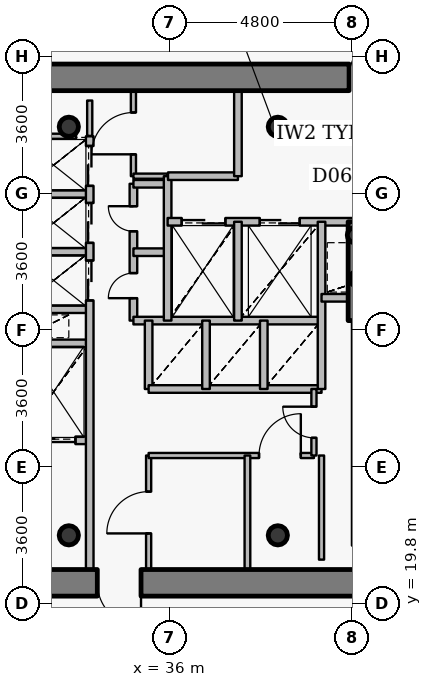
"""IFC4 building model, lengths in metres.
Left out: names, types, materials, properties, quantities, classifications, styles, units other than length and angle.
Written with IfcOpenShell. Run it as: python <this file> out.ifc"""

import sys

from ifc_helpers import new_model, si_unit, direction, frame, frame_2d, origin, origin_2d, place, context, subcontext, project, spatial, rectangle, hollow_circle, extrude, source, transform, mapped, element, fill, save


model = new_model("IFC4")
c1 = context("Model", 3, precision=1e-05, world=origin(), true_north=direction((0.0, 1.0)))
c2 = subcontext(c1, "Body", "Model", "MODEL_VIEW")
j1 = project(units=[si_unit("LENGTHUNIT", "METRE"), si_unit("PLANEANGLEUNIT", "RADIAN")], contexts=[c1])
p1 = place(None, origin())
s1 = spatial("IfcSite", under=j1, at=p1, CompositionType="ELEMENT")
p2 = place(p1, origin())
s2 = spatial("IfcBuilding", under=s1, at=p2, CompositionType="ELEMENT")
p3 = place(p2, frame((0.0, 0.0, 214.05)))
s3 = spatial("IfcBuildingStorey", under=s2, at=p3, CompositionType="ELEMENT", Elevation=214.05)
for number, where, z_axis, x_axis in (
    (1, (33.35, 21.6, 0.0), (0.0, 0.0, 1.0), (1.0, 0.0, 0.0)),
    (2, (38.85, 21.6, 0.0), (0.0, 0.0, 1.0), (1.0, 0.0, 0.0)),
    (3, (38.85, 32.35, 0.0), (0.0, 0.0, 1.0), (1.0, 0.0, 0.0)),
    (4, (33.35, 32.35, 0.0), (0.0, 0.0, 1.0), (1.0, 0.0, 0.0)),
):
    element("IfcColumn", number, at=place(p3, frame(where, z_axis=z_axis, x_axis=x_axis)), inside=s3, PredefinedType="COLUMN", context=c2, shape_type="SweptSolid", body=[
        extrude(hollow_circle(Radius=0.254, WallThickness=0.02, at=origin_2d()), origin(), (0.0, 0.0, 1.0), 3.75),
    ])
for number, where, z_axis, x_axis in (
    (5, (40.95, 28.35, 0.0), (0.0, 0.0, 1.0), (1.0, 0.0, 0.0)),
    (6, (40.88, 29.5, 0.0), (0.0, 0.0, 1.0), (1.0, 0.0, 0.0)),
):
    element("IfcColumn", number, at=place(p3, frame(where, z_axis=z_axis, x_axis=x_axis)), inside=s3, PredefinedType="COLUMN", context=c2, shape_type="SweptSolid", body=[
        extrude(hollow_circle(Radius=0.203, WallThickness=0.016, at=origin_2d()), origin(), (0.0, 0.0, 1.0), 3.75),
    ])
p4 = place(p3, frame((27.05, 33.65, 0.0), z_axis=(0.0, 0.0, 1.0), x_axis=(1.0, 0.0, 0.0)))
e7 = element("IfcWall", 7, at=p4, inside=s3, PredefinedType="SHEAR", context=c2, shape_type="SweptSolid", body=[
    extrude(rectangle(XDim=17.9, YDim=0.7, at=frame_2d((8.95, 0.0))), origin(), (0.0, 0.0, 1.0), 3.05),
])
p5 = place(p4, frame((13.675, 0.0, 0.0)))
e8 = element("IfcOpeningElement", 8, at=p5, cuts=e7, PredefinedType="OPENING", context=c2, shape_type="SweptSolid", body=[
    extrude(rectangle(XDim=1.15, YDim=2.15, at=origin_2d()), frame((0.575, 0.36, 1.075), z_axis=(0.0, -1.0, 0.0), x_axis=(1.0, 0.0, 0.0)), (0.0, 0.0, 1.0), 0.72),
])
p6 = place(p3, frame((44.95, 20.35, 0.0), z_axis=(0.0, 0.0, 1.0), x_axis=(-1.0, 0.0, 0.0)))
e9 = element("IfcWall", 9, at=p6, inside=s3, PredefinedType="SHEAR", context=c2, shape_type="SweptSolid", body=[
    extrude(rectangle(XDim=17.9, YDim=0.7, at=frame_2d((8.95, 0.0))), origin(), (0.0, 0.0, 1.0), 3.05),
])
p7 = place(p6, frame((9.7, 0.0, 0.0)))
e10 = element("IfcOpeningElement", 10, at=p7, cuts=e9, PredefinedType="OPENING", context=c2, shape_type="SweptSolid", body=[
    extrude(rectangle(XDim=1.15, YDim=2.15, at=origin_2d()), frame((0.575, 0.36, 1.075), z_axis=(0.0, -1.0, 0.0), x_axis=(1.0, 0.0, 0.0)), (0.0, 0.0, 1.0), 0.72),
])
p8 = place(p3, frame((40.9, 27.25, 0.0), z_axis=(0.0, 0.0, 1.0), x_axis=(0.0, 1.0, 0.0)))
e11 = element("IfcWall", 11, at=p8, inside=s3, PredefinedType="SHEAR", context=c2, shape_type="SweptSolid", body=[
    extrude(rectangle(XDim=2.6, YDim=0.4, at=frame_2d((1.3, 0.0))), origin(), (0.0, 0.0, 1.0), 3.1),
])
p9 = place(p3, frame((32.0, 24.1, 0.0), z_axis=(0.0, 0.0, 1.0), x_axis=(1.0, 0.0, 0.0)))
e12 = element("IfcWall", 12, at=p9, inside=s3, PredefinedType="PARTITIONING", context=c2, shape_type="SweptSolid", body=[
    extrude(rectangle(XDim=1.9, YDim=0.2, at=frame_2d((0.95, 0.0))), origin(), (0.0, 0.0, 1.0), 3.085),
])
p10 = place(p9, frame((0.375, 0.0, 0.0)))
e13 = element("IfcOpeningElement", 13, at=p10, cuts=e12, PredefinedType="OPENING", context=c2, shape_type="SweptSolid", body=[
    extrude(rectangle(XDim=1.15, YDim=2.15, at=origin_2d()), frame((0.575, 0.11, 1.075), z_axis=(0.0, -1.0, 0.0), x_axis=(1.0, 0.0, 0.0)), (0.0, 0.0, 1.0), 0.22),
])
for number, where, z_axis, x_axis in (
    (14, (32.0, 26.65, 0.0), (0.0, 0.0, 1.0), (1.0, 0.0, 0.0)),
    (15, (32.0, 27.55, 0.0), (0.0, 0.0, 1.0), (1.0, 0.0, 0.0)),
    (16, (32.0, 29.06, 0.0), (0.0, 0.0, 1.0), (1.0, 0.0, 0.0)),
    (17, (32.0, 30.58, 0.0), (0.0, 0.0, 1.0), (1.0, 0.0, 0.0)),
):
    element("IfcWall", number, at=place(p3, frame(where, z_axis=z_axis, x_axis=x_axis)), inside=s3, PredefinedType="PARTITIONING", context=c2, shape_type="SweptSolid", body=[
        extrude(rectangle(XDim=1.9, YDim=0.2, at=frame_2d((0.95, 0.0))), origin(), (0.0, 0.0, 1.0), 3.085),
    ])
p11 = place(p3, frame((33.9, 20.7, 0.0), z_axis=(0.0, 0.0, 1.0), x_axis=(0.0, 1.0, 0.0)))
e18 = element("IfcWall", 18, at=p11, inside=s3, PredefinedType="PARTITIONING", context=c2, shape_type="SweptSolid", body=[
    extrude(rectangle(XDim=11.4, YDim=0.2, at=frame_2d((5.7, 0.0))), origin(), (0.0, 0.0, 1.0), 3.085),
])
p12 = place(p11, frame((7.08, 0.0, 0.0)))
e19 = element("IfcOpeningElement", 19, at=p12, cuts=e18, PredefinedType="OPENING", context=c2, shape_type="SweptSolid", body=[
    extrude(rectangle(XDim=1.05, YDim=2.15, at=origin_2d()), frame((0.525, 0.11, 1.075), z_axis=(0.0, -1.0, 0.0), x_axis=(1.0, 0.0, 0.0)), (0.0, 0.0, 1.0), 0.22),
])
p13 = place(p11, frame((8.595, 0.0, 0.0)))
e20 = element("IfcOpeningElement", 20, at=p13, cuts=e18, PredefinedType="OPENING", context=c2, shape_type="SweptSolid", body=[
    extrude(rectangle(XDim=1.05, YDim=2.15, at=origin_2d()), frame((0.525, 0.11, 1.075), z_axis=(0.0, -1.0, 0.0), x_axis=(1.0, 0.0, 0.0)), (0.0, 0.0, 1.0), 0.22),
])
p14 = place(p11, frame((10.095, 0.0, 0.0)))
e21 = element("IfcOpeningElement", 21, at=p14, cuts=e18, PredefinedType="OPENING", context=c2, shape_type="SweptSolid", body=[
    extrude(rectangle(XDim=1.05, YDim=2.15, at=origin_2d()), frame((0.525, 0.11, 1.075), z_axis=(0.0, -1.0, 0.0), x_axis=(1.0, 0.0, 0.0)), (0.0, 0.0, 1.0), 0.22),
])
p15 = place(p3, frame((35.05, 27.25, 0.0), z_axis=(0.0, 0.0, 1.0), x_axis=(0.0, 1.0, 0.0)))
e22 = element("IfcWall", 22, at=p15, inside=s3, PredefinedType="PARTITIONING", context=c2, shape_type="SweptSolid", body=[
    extrude(rectangle(XDim=3.6, YDim=0.2, at=frame_2d((1.8, 0.0))), origin(), (0.0, 0.0, 1.0), 3.5),
])
p16 = place(p15, frame((0.59, 0.0, 0.0)))
e23 = element("IfcOpeningElement", 23, at=p16, cuts=e22, PredefinedType="OPENING", context=c2, shape_type="SweptSolid", body=[
    extrude(rectangle(XDim=0.66, YDim=2.05, at=origin_2d()), frame((0.33, 0.11, 1.025), z_axis=(0.0, -1.0, 0.0), x_axis=(1.0, 0.0, 0.0)), (0.0, 0.0, 1.0), 0.22),
])
p17 = place(p15, frame((2.35, 0.0, 0.0)))
e24 = element("IfcOpeningElement", 24, at=p17, cuts=e22, PredefinedType="OPENING", context=c2, shape_type="SweptSolid", body=[
    extrude(rectangle(XDim=0.66, YDim=2.05, at=origin_2d()), frame((0.33, 0.11, 1.025), z_axis=(0.0, -1.0, 0.0), x_axis=(1.0, 0.0, 0.0)), (0.0, 0.0, 1.0), 0.22),
])
p18 = place(p3, frame((35.05, 27.25, 0.0), z_axis=(0.0, 0.0, 1.0), x_axis=(1.0, 0.0, 0.0)))
e25 = element("IfcWall", 25, at=p18, inside=s3, PredefinedType="PARTITIONING", context=c2, shape_type="SweptSolid", body=[
    extrude(rectangle(XDim=4.95, YDim=0.2, at=frame_2d((2.475, 0.0))), origin(), (0.0, 0.0, 1.0), 3.085),
])
for number, where, z_axis, x_axis in (
    (26, (35.05, 29.05, 0.0), (0.0, 0.0, 1.0), (1.0, 0.0, 0.0)),
    (27, (35.05, 30.85, 0.0), (0.0, 0.0, 1.0), (1.0, 0.0, 0.0)),
):
    element("IfcWall", number, at=place(p3, frame(where, z_axis=z_axis, x_axis=x_axis)), inside=s3, PredefinedType="PARTITIONING", context=c2, shape_type="SweptSolid", body=[
        extrude(rectangle(XDim=0.9, YDim=0.2, at=frame_2d((0.45, 0.0))), origin(), (0.0, 0.0, 1.0), 3.5),
    ])
p19 = place(p3, frame((35.05, 31.05, 0.0), z_axis=(0.0, 0.0, 1.0), x_axis=(0.0, 1.0, 0.0)))
e28 = element("IfcWall", 28, at=p19, inside=s3, PredefinedType="PARTITIONING", context=c2, shape_type="SweptSolid", body=[
    extrude(rectangle(XDim=2.25, YDim=0.135, at=frame_2d((1.125, 0.0))), origin(), (0.0, 0.0, 1.0), 3.085),
])
p20 = place(p19, frame((0.575, 0.0, 0.0)))
e29 = element("IfcOpeningElement", 29, at=p20, cuts=e28, PredefinedType="OPENING", context=c2, shape_type="SweptSolid", body=[
    extrude(rectangle(XDim=1.1, YDim=2.15, at=origin_2d()), frame((0.55, 0.078, 1.075), z_axis=(0.0, -1.0, 0.0), x_axis=(1.0, 0.0, 0.0)), (0.0, 0.0, 1.0), 0.155),
])
p21 = place(p3, frame((35.05, 31.05, 0.0), z_axis=(0.0, 0.0, 1.0), x_axis=(1.0, 0.0, 0.0)))
e30 = element("IfcWall", 30, at=p21, inside=s3, PredefinedType="PARTITIONING", context=c2, shape_type="SweptSolid", body=[
    extrude(rectangle(XDim=0.9, YDim=0.135, at=frame_2d((0.45, 0.0))), origin(), (0.0, 0.0, 1.0), 3.5),
])
p22 = place(p3, frame((35.45, 20.7, 0.0), z_axis=(0.0, 0.0, 1.0), x_axis=(0.0, 1.0, 0.0)))
e31 = element("IfcWall", 31, at=p22, inside=s3, PredefinedType="PARTITIONING", context=c2, shape_type="SweptSolid", body=[
    extrude(rectangle(XDim=3.0, YDim=0.135, at=frame_2d((1.5, 0.0))), origin(), (0.0, 0.0, 1.0), 3.085),
])
p23 = place(p22, frame((0.95, 0.0, 0.0)))
e32 = element("IfcOpeningElement", 32, at=p23, cuts=e31, PredefinedType="OPENING", context=c2, shape_type="SweptSolid", body=[
    extrude(rectangle(XDim=1.1, YDim=2.15, at=origin_2d()), frame((0.55, 0.078, 1.075), z_axis=(0.0, -1.0, 0.0), x_axis=(1.0, 0.0, 0.0)), (0.0, 0.0, 1.0), 0.155),
])
p24 = place(p3, frame((35.45, 23.7, 0.0), z_axis=(0.0, 0.0, 1.0), x_axis=(1.0, 0.0, 0.0)))
e33 = element("IfcWall", 33, at=p24, inside=s3, PredefinedType="PARTITIONING", context=c2, shape_type="SweptSolid", body=[
    extrude(rectangle(XDim=4.35, YDim=0.135, at=frame_2d((2.175, 0.0))), origin(), (0.0, 0.0, 1.0), 3.085),
])
p25 = place(p24, frame((2.905, 0.0, 0.0)))
e34 = element("IfcOpeningElement", 34, at=p25, cuts=e33, PredefinedType="OPENING", context=c2, shape_type="SweptSolid", body=[
    extrude(rectangle(XDim=1.1, YDim=2.15, at=origin_2d()), frame((0.55, 0.078, 1.075), z_axis=(0.0, -1.0, 0.0), x_axis=(1.0, 0.0, 0.0)), (0.0, 0.0, 1.0), 0.155),
])
p26 = place(p3, frame((35.45, 25.45, 0.0), z_axis=(0.0, 0.0, 1.0), x_axis=(0.0, 1.0, 0.0)))
e35 = element("IfcWall", 35, at=p26, inside=s3, PredefinedType="PARTITIONING", context=c2, shape_type="SweptSolid", body=[
    extrude(rectangle(XDim=1.8, YDim=0.2, at=frame_2d((0.9, 0.0))), origin(), (0.0, 0.0, 1.0), 3.5),
])
p27 = place(p3, frame((35.45, 25.45, 0.0), z_axis=(0.0, 0.0, 1.0), x_axis=(1.0, 0.0, 0.0)))
e36 = element("IfcWall", 36, at=p27, inside=s3, PredefinedType="PARTITIONING", context=c2, shape_type="SweptSolid", body=[
    extrude(rectangle(XDim=4.55, YDim=0.2, at=frame_2d((2.275, 0.0))), origin(), (0.0, 0.0, 1.0), 3.085),
])
p28 = place(p3, frame((35.95, 27.25, 0.0), z_axis=(0.0, 0.0, 1.0), x_axis=(0.0, 1.0, 0.0)))
e37 = element("IfcWall", 37, at=p28, inside=s3, PredefinedType="PARTITIONING", context=c2, shape_type="SweptSolid", body=[
    extrude(rectangle(XDim=3.8, YDim=0.2, at=frame_2d((1.9, 0.0))), origin(), (0.0, 0.0, 1.0), 3.5),
])
p29 = place(p3, frame((35.95, 29.85, 0.0), z_axis=(0.0, 0.0, 1.0), x_axis=(1.0, 0.0, 0.0)))
e38 = element("IfcWall", 38, at=p29, inside=s3, PredefinedType="PARTITIONING", context=c2, shape_type="SweptSolid", body=[
    extrude(rectangle(XDim=8.49, YDim=0.2, at=frame_2d((4.245, 0.0))), origin(), (0.0, 0.0, 1.0), 3.085),
])
p30 = place(p29, frame((6.1, 0.0, 0.0)))
e39 = element("IfcOpeningElement", 39, at=p30, cuts=e38, PredefinedType="OPENING", context=c2, shape_type="SweptSolid", body=[
    extrude(rectangle(XDim=1.2, YDim=2.15, at=origin_2d()), frame((0.6, 0.11, 1.075), z_axis=(0.0, -1.0, 0.0), x_axis=(1.0, 0.0, 0.0)), (0.0, 0.0, 1.0), 0.22),
])
p31 = place(p29, frame((0.37, 0.0, 0.0)))
e40 = element("IfcOpeningElement", 40, at=p31, cuts=e38, PredefinedType="OPENING", context=c2, shape_type="SweptSolid", body=[
    extrude(rectangle(XDim=1.15, YDim=2.15, at=origin_2d()), frame((0.575, 0.11, 1.075), z_axis=(0.0, -1.0, 0.0), x_axis=(1.0, 0.0, 0.0)), (0.0, 0.0, 1.0), 0.22),
])
p32 = place(p29, frame((2.425, 0.0, 0.0)))
e41 = element("IfcOpeningElement", 41, at=p32, cuts=e38, PredefinedType="OPENING", context=c2, shape_type="SweptSolid", body=[
    extrude(rectangle(XDim=1.05, YDim=2.15, at=origin_2d()), frame((0.525, 0.11, 1.075), z_axis=(0.0, -1.0, 0.0), x_axis=(1.0, 0.0, 0.0)), (0.0, 0.0, 1.0), 0.22),
])
p33 = place(p3, frame((35.96, 31.05, 0.0), z_axis=(0.0, 0.0, 1.0), x_axis=(1.0, 0.0, 0.0)))
e42 = element("IfcWall", 42, at=p33, inside=s3, PredefinedType="PARTITIONING", context=c2, shape_type="SweptSolid", body=[
    extrude(rectangle(XDim=1.84, YDim=0.2, at=frame_2d((0.92, 0.0))), origin(), (0.0, 0.0, 1.0), 3.5),
])
p34 = place(p3, frame((36.96, 25.45, 0.0), z_axis=(0.0, 0.0, 1.0), x_axis=(0.0, 1.0, 0.0)))
e43 = element("IfcWall", 43, at=p34, inside=s3, PredefinedType="PARTITIONING", context=c2, shape_type="SweptSolid", body=[
    extrude(rectangle(XDim=1.8, YDim=0.2, at=frame_2d((0.9, 0.0))), origin(), (0.0, 0.0, 1.0), 3.5),
])
p35 = place(p3, frame((37.8, 27.25, 0.0), z_axis=(0.0, 0.0, 1.0), x_axis=(0.0, 1.0, 0.0)))
e44 = element("IfcWall", 44, at=p35, inside=s3, PredefinedType="PARTITIONING", context=c2, shape_type="SweptSolid", body=[
    extrude(rectangle(XDim=2.6, YDim=0.2, at=frame_2d((1.3, 0.0))), origin(), (0.0, 0.0, 1.0), 3.5),
])
p36 = place(p3, frame((37.8, 31.05, 0.0), z_axis=(0.0, 0.0, 1.0), x_axis=(0.0, 1.0, 0.0)))
e45 = element("IfcWall", 45, at=p36, inside=s3, PredefinedType="PARTITIONING", context=c2, shape_type="SweptSolid", body=[
    extrude(rectangle(XDim=2.25, YDim=0.2, at=frame_2d((1.125, 0.0))), origin(), (0.0, 0.0, 1.0), 3.085),
])
p37 = place(p3, frame((38.05, 20.18, 0.0), z_axis=(0.0, 0.0, 1.0), x_axis=(0.0, 1.0, 0.0)))
e46 = element("IfcWall", 46, at=p37, inside=s3, PredefinedType="PARTITIONING", context=c2, shape_type="SweptSolid", body=[
    extrude(rectangle(XDim=3.52, YDim=0.15, at=frame_2d((1.76, 0.0))), origin(), (0.0, 0.0, 1.0), 3.035),
])
p38 = place(p3, frame((38.48, 25.45, 0.0), z_axis=(0.0, 0.0, 1.0), x_axis=(0.0, 1.0, 0.0)))
e47 = element("IfcWall", 47, at=p38, inside=s3, PredefinedType="PARTITIONING", context=c2, shape_type="SweptSolid", body=[
    extrude(rectangle(XDim=1.8, YDim=0.2, at=frame_2d((0.9, 0.0))), origin(), (0.0, 0.0, 1.0), 3.5),
])
p39 = place(p3, frame((39.8, 23.7, 0.0), z_axis=(0.0, 0.0, 1.0), x_axis=(0.0, 1.0, 0.0)))
e48 = element("IfcWall", 48, at=p39, inside=s3, PredefinedType="PARTITIONING", context=c2, shape_type="SweptSolid", body=[
    extrude(rectangle(XDim=1.75, YDim=0.135, at=frame_2d((0.875, 0.0))), origin(), (0.0, 0.0, 1.0), 3.5),
])
p40 = place(p39, frame((0.465, 0.0, 0.0)))
e49 = element("IfcOpeningElement", 49, at=p40, cuts=e48, PredefinedType="OPENING", context=c2, shape_type="SweptSolid", body=[
    extrude(rectangle(XDim=0.82, YDim=2.1, at=origin_2d()), frame((0.41, 0.078, 1.05), z_axis=(0.0, -1.0, 0.0), x_axis=(1.0, 0.0, 0.0)), (0.0, 0.0, 1.0), 0.155),
])
p41 = place(p3, frame((40.0, 25.45, 0.0), z_axis=(0.0, 0.0, 1.0), x_axis=(0.0, 1.0, 0.0)))
e50 = element("IfcWall", 50, at=p41, inside=s3, PredefinedType="PARTITIONING", context=c2, shape_type="SweptSolid", body=[
    extrude(rectangle(XDim=4.4, YDim=0.2, at=frame_2d((2.2, 0.0))), origin(), (0.0, 0.0, 1.0), 3.5),
])
p42 = place(p3, frame((40.0, 27.85, 0.0), z_axis=(0.0, 0.0, 1.0), x_axis=(1.0, 0.0, 0.0)))
e51 = element("IfcWall", 51, at=p42, inside=s3, PredefinedType="PARTITIONING", context=c2, shape_type="SweptSolid", body=[
    extrude(rectangle(XDim=0.9, YDim=0.2, at=frame_2d((0.45, 0.0))), origin(), (0.0, 0.0, 1.0), 3.5),
])
p43 = place(p3, frame((40.9, 21.33, 0.0), z_axis=(0.0, 0.0, 1.0), x_axis=(0.0, 1.0, 0.0)))
e52 = element("IfcWall", 52, at=p43, inside=s3, PredefinedType="PARTITIONING", context=c2, shape_type="SweptSolid", body=[
    extrude(rectangle(XDim=5.91, YDim=0.2, at=frame_2d((2.955, 0.0))), origin(), (0.0, 0.0, 1.0), 3.035),
])
p44 = place(p3, frame((32.36, 32.1, 0.0), z_axis=(0.0, 0.0, 1.0), x_axis=(1.0, 0.0, 0.0)))
e53 = element("IfcWall", 53, at=p44, inside=s3, PredefinedType="PARTITIONING", context=c2, shape_type="SweptSolid", body=[
    extrude(rectangle(XDim=1.18, YDim=0.135, at=frame_2d((0.59, 0.0))), origin(), (0.0, 0.0, 1.0), 3.085),
])
p45 = place(p3, frame((40.0, 23.7, 0.0), z_axis=(0.0, 0.0, 1.0), x_axis=(0.0, -1.0, 0.0)))
e54 = element("IfcWall", 54, at=p45, inside=s3, PredefinedType="PARTITIONING", context=c2, shape_type="SweptSolid", body=[
    extrude(rectangle(XDim=2.74, YDim=0.135, at=frame_2d((1.37, 0.0))), origin(), (0.0, 0.0, 1.0), 3.035),
])
p46 = place(p3, frame((33.9, 32.11, 0.0), z_axis=(0.0, 0.0, 1.0), x_axis=(0.0, 1.0, 0.0)))
e55 = element("IfcWall", 55, at=p46, inside=s3, PredefinedType="PARTITIONING", context=c2, shape_type="SweptSolid", body=[
    extrude(rectangle(XDim=0.93, YDim=0.135, at=frame_2d((0.465, 0.0))), origin(), (0.0, 0.0, 1.0), 3.085),
])
m1 = source(origin(), c2, "Body", "SweptSolid", [
    extrude(rectangle(XDim=1.15, YDim=2.15, at=origin_2d()), frame((0.575, 0.025, 1.075), z_axis=(0.0, -1.0, 0.0), x_axis=(1.0, 0.0, 0.0)), (0.0, 0.0, 1.0), 0.05),
])
p47 = place(p5, origin())
e56 = element("IfcDoor", 56, at=p47, inside=s3, OperationType="SINGLE_SWING_RIGHT", PredefinedType="DOOR", context=c2, shape_type="MappedRepresentation", body=[
    mapped(m1, transform((0.0, 0.0, 0.0), x_axis=(1.0, 0.0, 0.0), y_axis=(0.0, 1.0, 0.0), z_axis=(0.0, 0.0, 1.0), scale=1.0)),
])
fill(e8, e56)
p48 = place(p7, origin())
e57 = element("IfcDoor", 57, at=p48, inside=s3, OperationType="SINGLE_SWING_LEFT", PredefinedType="DOOR", context=c2, shape_type="MappedRepresentation", body=[
    mapped(m1, transform((0.0, 0.0, 0.0), x_axis=(1.0, 0.0, 0.0), y_axis=(0.0, 1.0, 0.0), z_axis=(0.0, 0.0, 1.0), scale=1.0)),
])
fill(e10, e57)
m2 = source(origin(), c2, "Body", "SweptSolid", [
    extrude(rectangle(XDim=1.15, YDim=2.15, at=origin_2d()), frame((0.575, 0.025, 1.075), z_axis=(0.0, -1.0, 0.0), x_axis=(1.0, 0.0, 0.0)), (0.0, 0.0, 1.0), 0.05),
])
p49 = place(p31, origin())
e58 = element("IfcDoor", 58, at=p49, inside=s3, OperationType="DOUBLE_DOOR_SLIDING", PredefinedType="USERDEFINED", context=c2, shape_type="MappedRepresentation", body=[
    mapped(m2, transform((0.0, 0.0, 0.0), x_axis=(1.0, 0.0, 0.0), y_axis=(0.0, 1.0, 0.0), z_axis=(0.0, 0.0, 1.0), scale=1.0)),
])
fill(e40, e58)
p50 = place(p10, origin())
e59 = element("IfcDoor", 59, at=p50, inside=s3, OperationType="DOUBLE_DOOR_SLIDING", PredefinedType="USERDEFINED", context=c2, shape_type="MappedRepresentation", body=[
    mapped(m2, transform((0.0, 0.0, 0.0), x_axis=(1.0, 0.0, 0.0), y_axis=(0.0, 1.0, 0.0), z_axis=(0.0, 0.0, 1.0), scale=1.0)),
])
fill(e13, e59)
m3 = source(origin(), c2, "Body", "SweptSolid", [
    extrude(rectangle(XDim=1.05, YDim=2.15, at=origin_2d()), frame((0.525, 0.025, 1.075), z_axis=(0.0, -1.0, 0.0), x_axis=(1.0, 0.0, 0.0)), (0.0, 0.0, 1.0), 0.05),
])
p51 = place(p32, origin())
e60 = element("IfcDoor", 60, at=p51, inside=s3, OperationType="DOUBLE_DOOR_SLIDING", PredefinedType="USERDEFINED", context=c2, shape_type="MappedRepresentation", body=[
    mapped(m3, transform((0.0, 0.0, 0.0), x_axis=(1.0, 0.0, 0.0), y_axis=(0.0, 1.0, 0.0), z_axis=(0.0, 0.0, 1.0), scale=1.0)),
])
fill(e41, e60)
p52 = place(p12, origin())
e61 = element("IfcDoor", 61, at=p52, inside=s3, OperationType="DOUBLE_DOOR_SLIDING", PredefinedType="USERDEFINED", context=c2, shape_type="MappedRepresentation", body=[
    mapped(m3, transform((0.0, 0.0, 0.0), x_axis=(1.0, 0.0, 0.0), y_axis=(0.0, 1.0, 0.0), z_axis=(0.0, 0.0, 1.0), scale=1.0)),
])
fill(e19, e61)
p53 = place(p13, origin())
e62 = element("IfcDoor", 62, at=p53, inside=s3, OperationType="DOUBLE_DOOR_SLIDING", PredefinedType="USERDEFINED", context=c2, shape_type="MappedRepresentation", body=[
    mapped(m3, transform((0.0, 0.0, 0.0), x_axis=(1.0, 0.0, 0.0), y_axis=(0.0, 1.0, 0.0), z_axis=(0.0, 0.0, 1.0), scale=1.0)),
])
fill(e20, e62)
p54 = place(p14, origin())
e63 = element("IfcDoor", 63, at=p54, inside=s3, OperationType="DOUBLE_DOOR_SLIDING", PredefinedType="USERDEFINED", context=c2, shape_type="MappedRepresentation", body=[
    mapped(m3, transform((0.0, 0.0, 0.0), x_axis=(1.0, 0.0, 0.0), y_axis=(0.0, 1.0, 0.0), z_axis=(0.0, 0.0, 1.0), scale=1.0)),
])
fill(e21, e63)
m4 = source(origin(), c2, "Body", "SweptSolid", [
    extrude(rectangle(XDim=0.66, YDim=2.05, at=origin_2d()), frame((0.33, 0.025, 1.025), z_axis=(0.0, -1.0, 0.0), x_axis=(1.0, 0.0, 0.0)), (0.0, 0.0, 1.0), 0.05),
])
p55 = place(p16, origin())
e64 = element("IfcDoor", 64, at=p55, inside=s3, OperationType="SINGLE_SWING_LEFT", PredefinedType="USERDEFINED", context=c2, shape_type="MappedRepresentation", body=[
    mapped(m4, transform((0.0, 0.0, 0.0), x_axis=(1.0, 0.0, 0.0), y_axis=(0.0, 1.0, 0.0), z_axis=(0.0, 0.0, 1.0), scale=1.0)),
])
fill(e23, e64)
p56 = place(p17, origin())
e65 = element("IfcDoor", 65, at=p56, inside=s3, OperationType="SINGLE_SWING_RIGHT", PredefinedType="USERDEFINED", context=c2, shape_type="MappedRepresentation", body=[
    mapped(m4, transform((0.0, 0.0, 0.0), x_axis=(1.0, 0.0, 0.0), y_axis=(0.0, 1.0, 0.0), z_axis=(0.0, 0.0, 1.0), scale=1.0)),
])
fill(e24, e65)
m5 = source(origin(), c2, "Body", "SweptSolid", [
    extrude(rectangle(XDim=1.1, YDim=2.15, at=origin_2d()), frame((0.55, 0.025, 1.075), z_axis=(0.0, -1.0, 0.0), x_axis=(1.0, 0.0, 0.0)), (0.0, 0.0, 1.0), 0.05),
])
p57 = place(p23, origin())
e66 = element("IfcDoor", 66, at=p57, inside=s3, OperationType="SINGLE_SWING_LEFT", PredefinedType="DOOR", context=c2, shape_type="MappedRepresentation", body=[
    mapped(m5, transform((0.0, 0.0, 0.0), x_axis=(1.0, 0.0, 0.0), y_axis=(0.0, 1.0, 0.0), z_axis=(0.0, 0.0, 1.0), scale=1.0)),
])
fill(e32, e66)
p58 = place(p25, origin())
e67 = element("IfcDoor", 67, at=p58, inside=s3, OperationType="SINGLE_SWING_RIGHT", PredefinedType="DOOR", context=c2, shape_type="MappedRepresentation", body=[
    mapped(m5, transform((0.0, 0.0, 0.0), x_axis=(1.0, 0.0, 0.0), y_axis=(0.0, 1.0, 0.0), z_axis=(0.0, 0.0, 1.0), scale=1.0)),
])
fill(e34, e67)
p59 = place(p20, origin())
e68 = element("IfcDoor", 68, at=p59, inside=s3, OperationType="SINGLE_SWING_LEFT", PredefinedType="DOOR", context=c2, shape_type="MappedRepresentation", body=[
    mapped(m5, transform((0.0, 0.0, 0.0), x_axis=(1.0, 0.0, 0.0), y_axis=(0.0, 1.0, 0.0), z_axis=(0.0, 0.0, 1.0), scale=1.0)),
])
fill(e29, e68)
m6 = source(origin(), c2, "Body", "SweptSolid", [
    extrude(rectangle(XDim=0.82, YDim=2.1, at=origin_2d()), frame((0.41, 0.025, 1.05), z_axis=(0.0, -1.0, 0.0), x_axis=(1.0, 0.0, 0.0)), (0.0, 0.0, 1.0), 0.05),
])
p60 = place(p40, origin())
e69 = element("IfcDoor", 69, at=p60, inside=s3, OperationType="SINGLE_SWING_RIGHT", PredefinedType="DOOR", context=c2, shape_type="MappedRepresentation", body=[
    mapped(m6, transform((0.0, 0.0, 0.0), x_axis=(1.0, 0.0, 0.0), y_axis=(0.0, 1.0, 0.0), z_axis=(0.0, 0.0, 1.0), scale=1.0)),
])
fill(e49, e69)
save(model, sys.argv[1])
